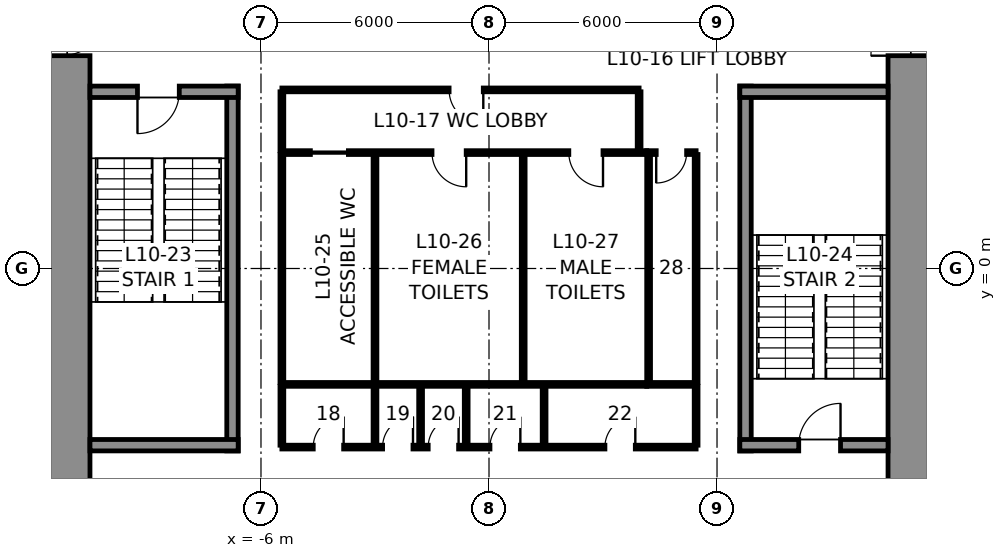
"""IFC4 building model, lengths in metres.
Left out: names, types, materials, properties, quantities, classifications, styles, units other than length and angle.
Written with IfcOpenShell. Run it as: python <this file> out.ifc"""

import sys

from ifc_helpers import new_model, si_unit, direction, frame, frame_2d, origin, place, context, subcontext, project, spatial, rectangle, extrude, element, fill, save


model = new_model("IFC4")
c1 = context("Model", 3, precision=1e-05, world=origin(), true_north=direction((0.0, 1.0)))
c2 = subcontext(c1, "Body", "Model", "MODEL_VIEW")
j1 = project(units=[si_unit("LENGTHUNIT", "METRE"), si_unit("PLANEANGLEUNIT", "RADIAN")], contexts=[c1])
p1 = place(None, origin())
s1 = spatial("IfcSite", under=j1, at=p1, CompositionType="ELEMENT")
p2 = place(p1, origin())
s2 = spatial("IfcBuilding", under=s1, at=p2, CompositionType="ELEMENT")
p3 = place(p2, frame((0.0, 0.0, 54.0)))
s3 = spatial("IfcBuildingStorey", under=s2, at=p3, CompositionType="ELEMENT", Elevation=54.0)
p4 = place(p3, frame((11.25, 10.5, 0.0), z_axis=(0.0, 0.0, 1.0), x_axis=(0.0, -1.0, 0.0)))
e1 = element("IfcWall", 1, at=p4, inside=s3, PredefinedType="SHEAR", context=c2, shape_type="SweptSolid", body=[
    extrude(rectangle(XDim=21.0, YDim=1.5, at=frame_2d((10.5, 0.0))), origin(), (0.0, 0.0, 1.0), 5.5),
])
p5 = place(p4, frame((3.7, 0.0, 0.0)))
e2 = element("IfcOpeningElement", 2, at=p5, cuts=e1, PredefinedType="OPENING", context=c2, shape_type="SweptSolid", body=[
    extrude(rectangle(XDim=1.2, YDim=2.3, at=frame_2d((0.6, 1.15))), frame((0.0, 0.76, 0.0), z_axis=(0.0, -1.0, 0.0), x_axis=(1.0, 0.0, 0.0)), (0.0, 0.0, 1.0), 1.52),
])
p6 = place(p4, frame((16.1, 0.0, 0.0)))
e3 = element("IfcOpeningElement", 3, at=p6, cuts=e1, PredefinedType="OPENING", context=c2, shape_type="SweptSolid", body=[
    extrude(rectangle(XDim=1.2, YDim=2.3, at=frame_2d((0.6, 1.15))), frame((0.0, 0.76, 0.0), z_axis=(0.0, -1.0, 0.0), x_axis=(1.0, 0.0, 0.0)), (0.0, 0.0, 1.0), 1.52),
])
p7 = place(p3, frame((-11.25, -10.5, 0.0), z_axis=(0.0, 0.0, 1.0), x_axis=(0.0, 1.0, 0.0)))
e4 = element("IfcWall", 4, at=p7, inside=s3, PredefinedType="SHEAR", context=c2, shape_type="SweptSolid", body=[
    extrude(rectangle(XDim=21.0, YDim=1.5, at=frame_2d((10.5, 0.0))), origin(), (0.0, 0.0, 1.0), 5.5),
])
p8 = place(p7, frame((16.1, 0.0, 0.0)))
e5 = element("IfcOpeningElement", 5, at=p8, cuts=e4, PredefinedType="OPENING", context=c2, shape_type="SweptSolid", body=[
    extrude(rectangle(XDim=1.2, YDim=2.3, at=frame_2d((0.6, 1.15))), frame((0.0, 0.76, 0.0), z_axis=(0.0, -1.0, 0.0), x_axis=(1.0, 0.0, 0.0)), (0.0, 0.0, 1.0), 1.52),
])
p9 = place(p7, frame((3.7, 0.0, 0.0)))
e6 = element("IfcOpeningElement", 6, at=p9, cuts=e4, PredefinedType="OPENING", context=c2, shape_type="SweptSolid", body=[
    extrude(rectangle(XDim=1.2, YDim=2.3, at=frame_2d((0.6, 1.15))), frame((0.0, 0.76, 0.0), z_axis=(0.0, -1.0, 0.0), x_axis=(1.0, 0.0, 0.0)), (0.0, 0.0, 1.0), 1.52),
])
p10 = place(p3, frame((-6.75, -4.8, 0.0), z_axis=(0.0, 0.0, 1.0), x_axis=(0.0, 1.0, 0.0)))
e7 = element("IfcWall", 7, at=p10, inside=s3, PredefinedType="SOLIDWALL", context=c2, shape_type="SweptSolid", body=[
    extrude(rectangle(XDim=9.6, YDim=0.3, at=frame_2d((4.8, 0.0))), origin(), (0.0, 0.0, 1.0), 5.25),
])
p11 = place(p3, frame((-10.5, 4.65, 0.0), z_axis=(0.0, 0.0, 1.0), x_axis=(1.0, 0.0, 0.0)))
e8 = element("IfcWall", 8, at=p11, inside=s3, PredefinedType="SOLIDWALL", context=c2, shape_type="SweptSolid", body=[
    extrude(rectangle(XDim=3.9, YDim=0.3, at=frame_2d((1.95, 0.0))), origin(), (0.0, 0.0, 1.0), 5.25),
])
p12 = place(p11, frame((1.25, 0.0, 0.0)))
e9 = element("IfcOpeningElement", 9, at=p12, cuts=e8, PredefinedType="OPENING", context=c2, shape_type="SweptSolid", body=[
    extrude(rectangle(XDim=1.1, YDim=2.3, at=frame_2d((0.55, 1.15))), frame((0.0, 0.16, 0.0), z_axis=(0.0, -1.0, 0.0), x_axis=(1.0, 0.0, 0.0)), (0.0, 0.0, 1.0), 0.32),
])
p13 = place(p3, frame((-6.6, -4.65, 0.0), z_axis=(0.0, 0.0, 1.0), x_axis=(-1.0, 0.0, 0.0)))
e10 = element("IfcWall", 10, at=p13, inside=s3, PredefinedType="SOLIDWALL", context=c2, shape_type="SweptSolid", body=[
    extrude(rectangle(XDim=3.9, YDim=0.3, at=frame_2d((1.95, 0.0))), origin(), (0.0, 0.0, 1.0), 5.25),
])
p14 = place(p3, frame((6.75, -4.8, 0.0), z_axis=(0.0, 0.0, 1.0), x_axis=(0.0, 1.0, 0.0)))
e11 = element("IfcWall", 11, at=p14, inside=s3, PredefinedType="SOLIDWALL", context=c2, shape_type="SweptSolid", body=[
    extrude(rectangle(XDim=9.6, YDim=0.3, at=frame_2d((4.8, 0.0))), origin(), (0.0, 0.0, 1.0), 5.25),
])
p15 = place(p3, frame((6.6, 4.65, 0.0), z_axis=(0.0, 0.0, 1.0), x_axis=(1.0, 0.0, 0.0)))
e12 = element("IfcWall", 12, at=p15, inside=s3, PredefinedType="SOLIDWALL", context=c2, shape_type="SweptSolid", body=[
    extrude(rectangle(XDim=3.9, YDim=0.3, at=frame_2d((1.95, 0.0))), origin(), (0.0, 0.0, 1.0), 5.25),
])
p16 = place(p3, frame((10.5, -4.65, 0.0), z_axis=(0.0, 0.0, 1.0), x_axis=(-1.0, 0.0, 0.0)))
e13 = element("IfcWall", 13, at=p16, inside=s3, PredefinedType="SOLIDWALL", context=c2, shape_type="SweptSolid", body=[
    extrude(rectangle(XDim=3.9, YDim=0.3, at=frame_2d((1.95, 0.0))), origin(), (0.0, 0.0, 1.0), 5.25),
])
p17 = place(p16, frame((1.25, 0.0, 0.0)))
e14 = element("IfcOpeningElement", 14, at=p17, cuts=e13, PredefinedType="OPENING", context=c2, shape_type="SweptSolid", body=[
    extrude(rectangle(XDim=1.1, YDim=2.3, at=frame_2d((0.55, 1.15))), frame((0.0, 0.16, 0.0), z_axis=(0.0, -1.0, 0.0), x_axis=(1.0, 0.0, 0.0)), (0.0, 0.0, 1.0), 0.32),
])
p18 = place(p3, frame((-5.45, 3.05, 0.0), z_axis=(0.0, 0.0, 1.0), x_axis=(1.0, 0.0, 0.0)))
e15 = element("IfcWall", 15, at=p18, inside=s3, PredefinedType="PARTITIONING", context=c2, shape_type="SweptSolid", body=[
    extrude(rectangle(XDim=9.6, YDim=0.1, at=frame_2d((4.8, 0.0))), origin(), (0.0, 0.0, 1.0), 5.25),
])
p19 = place(p18, frame((0.75, 0.0, 0.0)))
e16 = element("IfcOpeningElement", 16, at=p19, cuts=e15, PredefinedType="OPENING", context=c2, shape_type="SweptSolid", body=[
    extrude(rectangle(XDim=1.0, YDim=2.3, at=frame_2d((0.5, 1.15))), frame((0.0, 0.06, 0.0), z_axis=(0.0, -1.0, 0.0), x_axis=(1.0, 0.0, 0.0)), (0.0, 0.0, 1.0), 0.12),
])
p20 = place(p18, frame((3.95, 0.0, 0.0)))
e17 = element("IfcOpeningElement", 17, at=p20, cuts=e15, PredefinedType="OPENING", context=c2, shape_type="SweptSolid", body=[
    extrude(rectangle(XDim=0.9, YDim=2.3, at=frame_2d((0.45, 1.15))), frame((0.0, 0.06, 0.0), z_axis=(0.0, -1.0, 0.0), x_axis=(1.0, 0.0, 0.0)), (0.0, 0.0, 1.0), 0.12),
])
p21 = place(p18, frame((7.55, 0.0, 0.0)))
e18 = element("IfcOpeningElement", 18, at=p21, cuts=e15, PredefinedType="OPENING", context=c2, shape_type="SweptSolid", body=[
    extrude(rectangle(XDim=0.9, YDim=2.3, at=frame_2d((0.45, 1.15))), frame((0.0, 0.06, 0.0), z_axis=(0.0, -1.0, 0.0), x_axis=(1.0, 0.0, 0.0)), (0.0, 0.0, 1.0), 0.12),
])
p22 = place(p3, frame((4.15, 3.05, 0.0), z_axis=(0.0, 0.0, 1.0), x_axis=(1.0, 0.0, 0.0)))
e19 = element("IfcWall", 19, at=p22, inside=s3, PredefinedType="PARTITIONING", context=c2, shape_type="SweptSolid", body=[
    extrude(rectangle(XDim=1.3, YDim=0.1, at=frame_2d((0.65, 0.0))), origin(), (0.0, 0.0, 1.0), 5.25),
])
p23 = place(p22, frame((0.25, 0.0, 0.0)))
e20 = element("IfcOpeningElement", 20, at=p23, cuts=e19, PredefinedType="OPENING", context=c2, shape_type="SweptSolid", body=[
    extrude(rectangle(XDim=0.8, YDim=2.3, at=frame_2d((0.4, 1.15))), frame((0.0, 0.06, 0.0), z_axis=(0.0, -1.0, 0.0), x_axis=(1.0, 0.0, 0.0)), (0.0, 0.0, 1.0), 0.12),
])
p24 = place(p3, frame((4.15, -3.05, 0.0), z_axis=(0.0, 0.0, 1.0), x_axis=(-1.0, 0.0, 0.0)))
e21 = element("IfcWall", 21, at=p24, inside=s3, PredefinedType="PARTITIONING", context=c2, shape_type="SweptSolid", body=[
    extrude(rectangle(XDim=9.6, YDim=0.1, at=frame_2d((4.8, 0.0))), origin(), (0.0, 0.0, 1.0), 5.25),
])
p25 = place(p3, frame((5.45, -3.05, 0.0), z_axis=(0.0, 0.0, 1.0), x_axis=(-1.0, 0.0, 0.0)))
e22 = element("IfcWall", 22, at=p25, inside=s3, PredefinedType="PARTITIONING", context=c2, shape_type="SweptSolid", body=[
    extrude(rectangle(XDim=1.3, YDim=0.1, at=frame_2d((0.65, 0.0))), origin(), (0.0, 0.0, 1.0), 5.25),
])
for number, where, z_axis, x_axis in (
    (23, (5.45, 3.0, 0.0), (0.0, 0.0, 1.0), (0.0, -1.0, 0.0)),
    (24, (-5.45, -3.0, 0.0), (0.0, 0.0, 1.0), (0.0, 1.0, 0.0)),
    (25, (-3.0, -3.0, 0.0), (0.0, 0.0, 1.0), (0.0, 1.0, 0.0)),
    (26, (0.9, -3.0, 0.0), (0.0, 0.0, 1.0), (0.0, 1.0, 0.0)),
    (27, (4.2, -3.0, 0.0), (0.0, 0.0, 1.0), (0.0, 1.0, 0.0)),
):
    element("IfcWall", number, at=place(p3, frame(where, z_axis=z_axis, x_axis=x_axis)), inside=s3, PredefinedType="PARTITIONING", context=c2, shape_type="SweptSolid", body=[
        extrude(rectangle(XDim=6.0, YDim=0.1, at=frame_2d((3.0, 0.0))), origin(), (0.0, 0.0, 1.0), 5.25),
    ])
p26 = place(p3, frame((-5.45, 4.7, 0.0), z_axis=(0.0, 0.0, 1.0), x_axis=(1.0, 0.0, 0.0)))
e28 = element("IfcWall", 28, at=p26, inside=s3, PredefinedType="PARTITIONING", context=c2, shape_type="SweptSolid", body=[
    extrude(rectangle(XDim=9.4, YDim=0.1, at=frame_2d((4.7, 0.0))), origin(), (0.0, 0.0, 1.0), 5.25),
])
p27 = place(p26, frame((4.4, 0.0, 0.0)))
e29 = element("IfcOpeningElement", 29, at=p27, cuts=e28, PredefinedType="OPENING", context=c2, shape_type="SweptSolid", body=[
    extrude(rectangle(XDim=0.9, YDim=2.3, at=frame_2d((0.45, 1.15))), frame((0.0, 0.06, 0.0), z_axis=(0.0, -1.0, 0.0), x_axis=(1.0, 0.0, 0.0)), (0.0, 0.0, 1.0), 0.12),
])
for number, where, z_axis, x_axis in (
    (30, (-5.45, 3.1, 0.0), (0.0, 0.0, 1.0), (0.0, 1.0, 0.0)),
    (31, (3.95, 3.1, 0.0), (0.0, 0.0, 1.0), (0.0, 1.0, 0.0)),
):
    element("IfcWall", number, at=place(p3, frame(where, z_axis=z_axis, x_axis=x_axis)), inside=s3, PredefinedType="PARTITIONING", context=c2, shape_type="SweptSolid", body=[
        extrude(rectangle(XDim=1.55, YDim=0.1, at=frame_2d((0.775, 0.0))), origin(), (0.0, 0.0, 1.0), 5.25),
    ])
p28 = place(p3, frame((5.45, -4.7, 0.0), z_axis=(0.0, 0.0, 1.0), x_axis=(-1.0, 0.0, 0.0)))
e32 = element("IfcWall", 32, at=p28, inside=s3, PredefinedType="PARTITIONING", context=c2, shape_type="SweptSolid", body=[
    extrude(rectangle(XDim=10.9, YDim=0.1, at=frame_2d((5.45, 0.0))), origin(), (0.0, 0.0, 1.0), 5.25),
])
p29 = place(p28, frame((9.275, 0.0, 0.0)))
e33 = element("IfcOpeningElement", 33, at=p29, cuts=e32, PredefinedType="OPENING", context=c2, shape_type="SweptSolid", body=[
    extrude(rectangle(XDim=0.8, YDim=2.3, at=frame_2d((0.4, 1.15))), frame((0.0, 0.06, 0.0), z_axis=(0.0, -1.0, 0.0), x_axis=(1.0, 0.0, 0.0)), (0.0, 0.0, 1.0), 0.12),
])
p30 = place(p28, frame((7.45, 0.0, 0.0)))
e34 = element("IfcOpeningElement", 34, at=p30, cuts=e32, PredefinedType="OPENING", context=c2, shape_type="SweptSolid", body=[
    extrude(rectangle(XDim=0.8, YDim=2.3, at=frame_2d((0.4, 1.15))), frame((0.0, 0.06, 0.0), z_axis=(0.0, -1.0, 0.0), x_axis=(1.0, 0.0, 0.0)), (0.0, 0.0, 1.0), 0.12),
])
p31 = place(p28, frame((6.25, 0.0, 0.0)))
e35 = element("IfcOpeningElement", 35, at=p31, cuts=e32, PredefinedType="OPENING", context=c2, shape_type="SweptSolid", body=[
    extrude(rectangle(XDim=0.8, YDim=2.3, at=frame_2d((0.4, 1.15))), frame((0.0, 0.06, 0.0), z_axis=(0.0, -1.0, 0.0), x_axis=(1.0, 0.0, 0.0)), (0.0, 0.0, 1.0), 0.12),
])
p32 = place(p28, frame((4.625, 0.0, 0.0)))
e36 = element("IfcOpeningElement", 36, at=p32, cuts=e32, PredefinedType="OPENING", context=c2, shape_type="SweptSolid", body=[
    extrude(rectangle(XDim=0.8, YDim=2.3, at=frame_2d((0.4, 1.15))), frame((0.0, 0.06, 0.0), z_axis=(0.0, -1.0, 0.0), x_axis=(1.0, 0.0, 0.0)), (0.0, 0.0, 1.0), 0.12),
])
p33 = place(p28, frame((1.6, 0.0, 0.0)))
e37 = element("IfcOpeningElement", 37, at=p33, cuts=e32, PredefinedType="OPENING", context=c2, shape_type="SweptSolid", body=[
    extrude(rectangle(XDim=0.8, YDim=2.3, at=frame_2d((0.4, 1.15))), frame((0.0, 0.06, 0.0), z_axis=(0.0, -1.0, 0.0), x_axis=(1.0, 0.0, 0.0)), (0.0, 0.0, 1.0), 0.12),
])
for number, where, z_axis, x_axis in (
    (38, (-5.45, -3.1, 0.0), (0.0, 0.0, 1.0), (0.0, -1.0, 0.0)),
    (39, (5.45, -3.1, 0.0), (0.0, 0.0, 1.0), (0.0, -1.0, 0.0)),
    (40, (-3.0, -3.1, 0.0), (0.0, 0.0, 1.0), (0.0, -1.0, 0.0)),
    (41, (-1.8, -3.1, 0.0), (0.0, 0.0, 1.0), (0.0, -1.0, 0.0)),
    (42, (-0.6, -3.1, 0.0), (0.0, 0.0, 1.0), (0.0, -1.0, 0.0)),
    (43, (1.45, -3.1, 0.0), (0.0, 0.0, 1.0), (0.0, -1.0, 0.0)),
):
    element("IfcWall", number, at=place(p3, frame(where, z_axis=z_axis, x_axis=x_axis)), inside=s3, PredefinedType="PARTITIONING", context=c2, shape_type="SweptSolid", body=[
        extrude(rectangle(XDim=1.55, YDim=0.1, at=frame_2d((0.775, 0.0))), origin(), (0.0, 0.0, 1.0), 5.25),
    ])
p34 = place(p12, frame((1.1, 0.0, 0.0), z_axis=(0.0, 0.0, 1.0), x_axis=(-1.0, 0.0, 0.0)))
e44 = element("IfcDoor", 44, at=p34, inside=s3, OperationType="SINGLE_SWING_RIGHT", PredefinedType="DOOR", context=c2, shape_type="SweptSolid", body=[
    extrude(rectangle(XDim=1.1, YDim=2.3, at=frame_2d((0.55, 1.15))), frame((0.0, 0.025, 0.0), z_axis=(0.0, -1.0, 0.0), x_axis=(1.0, 0.0, 0.0)), (0.0, 0.0, 1.0), 0.05),
])
fill(e9, e44)
p35 = place(p17, frame((1.1, 0.0, 0.0), z_axis=(0.0, 0.0, 1.0), x_axis=(-1.0, 0.0, 0.0)))
e45 = element("IfcDoor", 45, at=p35, inside=s3, OperationType="SINGLE_SWING_RIGHT", PredefinedType="DOOR", context=c2, shape_type="SweptSolid", body=[
    extrude(rectangle(XDim=1.1, YDim=2.3, at=frame_2d((0.55, 1.15))), frame((0.0, 0.025, 0.0), z_axis=(0.0, -1.0, 0.0), x_axis=(1.0, 0.0, 0.0)), (0.0, 0.0, 1.0), 0.05),
])
fill(e14, e45)
p36 = place(p19, frame((1.0, 0.0, 0.0), z_axis=(0.0, 0.0, 1.0), x_axis=(-1.0, 0.0, 0.0)))
e46 = element("IfcDoor", 46, at=p36, inside=s3, OperationType="SLIDING_TO_LEFT", PredefinedType="DOOR", context=c2, shape_type="SweptSolid", body=[
    extrude(rectangle(XDim=1.0, YDim=2.3, at=frame_2d((0.5, 1.15))), frame((0.0, 0.025, 0.0), z_axis=(0.0, -1.0, 0.0), x_axis=(1.0, 0.0, 0.0)), (0.0, 0.0, 1.0), 0.05),
])
fill(e16, e46)
p37 = place(p20, frame((0.9, 0.0, 0.0), z_axis=(0.0, 0.0, 1.0), x_axis=(-1.0, 0.0, 0.0)))
e47 = element("IfcDoor", 47, at=p37, inside=s3, OperationType="SINGLE_SWING_LEFT", PredefinedType="DOOR", context=c2, shape_type="SweptSolid", body=[
    extrude(rectangle(XDim=0.9, YDim=2.3, at=frame_2d((0.45, 1.15))), frame((0.0, 0.025, 0.0), z_axis=(0.0, -1.0, 0.0), x_axis=(1.0, 0.0, 0.0)), (0.0, 0.0, 1.0), 0.05),
])
fill(e17, e47)
p38 = place(p21, frame((0.9, 0.0, 0.0), z_axis=(0.0, 0.0, 1.0), x_axis=(-1.0, 0.0, 0.0)))
e48 = element("IfcDoor", 48, at=p38, inside=s3, OperationType="SINGLE_SWING_LEFT", PredefinedType="DOOR", context=c2, shape_type="SweptSolid", body=[
    extrude(rectangle(XDim=0.9, YDim=2.3, at=frame_2d((0.45, 1.15))), frame((0.0, 0.025, 0.0), z_axis=(0.0, -1.0, 0.0), x_axis=(1.0, 0.0, 0.0)), (0.0, 0.0, 1.0), 0.05),
])
fill(e18, e48)
p39 = place(p23, frame((0.8, 0.0, 0.0), z_axis=(0.0, 0.0, 1.0), x_axis=(-1.0, 0.0, 0.0)))
e49 = element("IfcDoor", 49, at=p39, inside=s3, OperationType="SINGLE_SWING_RIGHT", PredefinedType="DOOR", context=c2, shape_type="SweptSolid", body=[
    extrude(rectangle(XDim=0.8, YDim=2.3, at=frame_2d((0.4, 1.15))), frame((0.0, 0.025, 0.0), z_axis=(0.0, -1.0, 0.0), x_axis=(1.0, 0.0, 0.0)), (0.0, 0.0, 1.0), 0.05),
])
fill(e20, e49)
p40 = place(p27, frame((0.9, 0.0, 0.0), z_axis=(0.0, 0.0, 1.0), x_axis=(-1.0, 0.0, 0.0)))
e50 = element("IfcDoor", 50, at=p40, inside=s3, OperationType="SINGLE_SWING_LEFT", PredefinedType="DOOR", context=c2, shape_type="SweptSolid", body=[
    extrude(rectangle(XDim=0.9, YDim=2.3, at=frame_2d((0.45, 1.15))), frame((0.0, 0.025, 0.0), z_axis=(0.0, -1.0, 0.0), x_axis=(1.0, 0.0, 0.0)), (0.0, 0.0, 1.0), 0.05),
])
fill(e29, e50)
p41 = place(p29, frame((0.8, 0.0, 0.0), z_axis=(0.0, 0.0, 1.0), x_axis=(-1.0, 0.0, 0.0)))
e51 = element("IfcDoor", 51, at=p41, inside=s3, OperationType="SINGLE_SWING_RIGHT", PredefinedType="DOOR", context=c2, shape_type="SweptSolid", body=[
    extrude(rectangle(XDim=0.8, YDim=2.3, at=frame_2d((0.4, 1.15))), frame((0.0, 0.025, 0.0), z_axis=(0.0, -1.0, 0.0), x_axis=(1.0, 0.0, 0.0)), (0.0, 0.0, 1.0), 0.05),
])
fill(e33, e51)
p42 = place(p30, frame((0.8, 0.0, 0.0), z_axis=(0.0, 0.0, 1.0), x_axis=(-1.0, 0.0, 0.0)))
e52 = element("IfcDoor", 52, at=p42, inside=s3, OperationType="SINGLE_SWING_RIGHT", PredefinedType="DOOR", context=c2, shape_type="SweptSolid", body=[
    extrude(rectangle(XDim=0.8, YDim=2.3, at=frame_2d((0.4, 1.15))), frame((0.0, 0.025, 0.0), z_axis=(0.0, -1.0, 0.0), x_axis=(1.0, 0.0, 0.0)), (0.0, 0.0, 1.0), 0.05),
])
fill(e34, e52)
p43 = place(p31, frame((0.8, 0.0, 0.0), z_axis=(0.0, 0.0, 1.0), x_axis=(-1.0, 0.0, 0.0)))
e53 = element("IfcDoor", 53, at=p43, inside=s3, OperationType="SINGLE_SWING_RIGHT", PredefinedType="DOOR", context=c2, shape_type="SweptSolid", body=[
    extrude(rectangle(XDim=0.8, YDim=2.3, at=frame_2d((0.4, 1.15))), frame((0.0, 0.025, 0.0), z_axis=(0.0, -1.0, 0.0), x_axis=(1.0, 0.0, 0.0)), (0.0, 0.0, 1.0), 0.05),
])
fill(e35, e53)
p44 = place(p32, frame((0.8, 0.0, 0.0), z_axis=(0.0, 0.0, 1.0), x_axis=(-1.0, 0.0, 0.0)))
e54 = element("IfcDoor", 54, at=p44, inside=s3, OperationType="SINGLE_SWING_RIGHT", PredefinedType="DOOR", context=c2, shape_type="SweptSolid", body=[
    extrude(rectangle(XDim=0.8, YDim=2.3, at=frame_2d((0.4, 1.15))), frame((0.0, 0.025, 0.0), z_axis=(0.0, -1.0, 0.0), x_axis=(1.0, 0.0, 0.0)), (0.0, 0.0, 1.0), 0.05),
])
fill(e36, e54)
p45 = place(p33, frame((0.8, 0.0, 0.0), z_axis=(0.0, 0.0, 1.0), x_axis=(-1.0, 0.0, 0.0)))
e55 = element("IfcDoor", 55, at=p45, inside=s3, OperationType="SINGLE_SWING_RIGHT", PredefinedType="DOOR", context=c2, shape_type="SweptSolid", body=[
    extrude(rectangle(XDim=0.8, YDim=2.3, at=frame_2d((0.4, 1.15))), frame((0.0, 0.025, 0.0), z_axis=(0.0, -1.0, 0.0), x_axis=(1.0, 0.0, 0.0)), (0.0, 0.0, 1.0), 0.05),
])
fill(e37, e55)
p46 = place(p8, frame((1.2, 0.0, 0.0), z_axis=(0.0, 0.0, 1.0), x_axis=(-1.0, 0.0, 0.0)))
e56 = element("IfcDoor", 56, at=p46, inside=s3, OperationType="SINGLE_SWING_LEFT", PredefinedType="DOOR", context=c2, shape_type="SweptSolid", body=[
    extrude(rectangle(XDim=1.2, YDim=2.3, at=frame_2d((0.6, 1.15))), frame((0.0, 0.025, 0.0), z_axis=(0.0, -1.0, 0.0), x_axis=(1.0, 0.0, 0.0)), (0.0, 0.0, 1.0), 0.05),
])
fill(e5, e56)
p47 = place(p5, frame((1.2, 0.0, 0.0), z_axis=(0.0, 0.0, 1.0), x_axis=(-1.0, 0.0, 0.0)))
e57 = element("IfcDoor", 57, at=p47, inside=s3, OperationType="SINGLE_SWING_LEFT", PredefinedType="DOOR", context=c2, shape_type="SweptSolid", body=[
    extrude(rectangle(XDim=1.2, YDim=2.3, at=frame_2d((0.6, 1.15))), frame((0.0, 0.025, 0.0), z_axis=(0.0, -1.0, 0.0), x_axis=(1.0, 0.0, 0.0)), (0.0, 0.0, 1.0), 0.05),
])
fill(e2, e57)
save(model, sys.argv[1])
